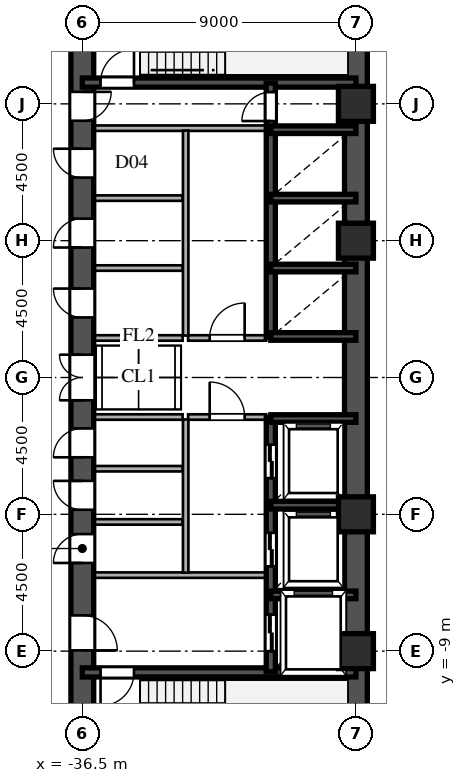
"""IFC4 building model, lengths in metres.
Left out: names, types, materials, properties, quantities, classifications, styles, units other than length and angle.
Written with IfcOpenShell. Run it as: python <this file> out.ifc"""

import sys

from ifc_helpers import new_model, si_unit, direction, frame, frame_2d, origin, origin_2d, place, context, subcontext, project, spatial, rectangle, hollow_rectangle, extrude, source, transform, mapped, element, fill, save


model = new_model("IFC4")
c1 = context("Model", 3, precision=1e-05, world=origin(), true_north=direction((0.0, 1.0)))
c2 = subcontext(c1, "Body", "Model", "MODEL_VIEW")
j1 = project(units=[si_unit("LENGTHUNIT", "METRE"), si_unit("PLANEANGLEUNIT", "RADIAN")], contexts=[c1])
p1 = place(None, origin())
s1 = spatial("IfcSite", under=j1, at=p1, CompositionType="ELEMENT")
p2 = place(p1, origin())
s2 = spatial("IfcBuilding", under=s1, at=p2, CompositionType="ELEMENT")
p3 = place(p2, frame((0.0, 0.0, 33.3)))
s3 = spatial("IfcBuildingStorey", under=s2, at=p3, CompositionType="ELEMENT", Elevation=33.3)
m1 = source(origin(), c2, "Body", "SweptSolid", [
    extrude(hollow_rectangle(XDim=1.15, YDim=1.15, WallThickness=0.048, at=origin_2d()), origin(), (0.0, 0.0, 1.0), 3.6),
])
for number, where, z_axis, x_axis in (
    (1, (-27.5, -9.0, 0.0), (0.0, 0.0, 1.0), (1.0, 0.0, 0.0)),
    (2, (-27.5, -4.5, 0.0), (0.0, 0.0, 1.0), (1.0, 0.0, 0.0)),
    (3, (-27.5, 4.5, 0.0), (0.0, 0.0, 1.0), (1.0, 0.0, 0.0)),
    (4, (-27.5, 9.0, 0.0), (0.0, 0.0, 1.0), (1.0, 0.0, 0.0)),
):
    element("IfcColumn", number, at=place(p3, frame(where, z_axis=z_axis, x_axis=x_axis)), inside=s3, PredefinedType="COLUMN", context=c2, shape_type="MappedRepresentation", body=[
        mapped(m1, transform((0.0, 0.0, 0.0), scale=1.0)),
    ])
for number, where, z_axis, x_axis in (
    (5, (-27.5, -13.5, 0.0), (0.0, 0.0, 1.0), (0.0, 1.0, 0.0)),
    (6, (-27.5, 1.3, 0.0), (0.0, 0.0, 1.0), (0.0, 1.0, 0.0)),
):
    element("IfcWall", number, at=place(p3, frame(where, z_axis=z_axis, x_axis=x_axis)), inside=s3, PredefinedType="SHEAR", context=c2, shape_type="SweptSolid", body=[
        extrude(rectangle(XDim=12.2, YDim=0.75, at=frame_2d((6.1, 0.0))), origin(), (0.0, 0.0, 1.0), 3.38),
    ])
p4 = place(p3, frame((-27.5, -1.3, 0.0), z_axis=(0.0, 0.0, 1.0), x_axis=(0.0, 1.0, 0.0)))
e7 = element("IfcWall", 7, at=p4, inside=s3, PredefinedType="SHEAR", context=c2, shape_type="SweptSolid", body=[
    extrude(rectangle(XDim=2.6, YDim=0.75, at=frame_2d((1.3, 0.0))), origin(), (0.0, 0.0, 1.0), 3.38),
])
p5 = place(p3, frame((-36.5, -13.65, 0.0), z_axis=(0.0, 0.0, 1.0), x_axis=(0.0, 1.0, 0.0)))
e8 = element("IfcWall", 8, at=p5, inside=s3, PredefinedType="SHEAR", context=c2, shape_type="SweptSolid", body=[
    extrude(rectangle(XDim=7.15, YDim=0.75, at=frame_2d((3.575, 0.0))), origin(), (0.0, 0.0, 1.0), 3.38),
])
p6 = place(p5, frame((4.675, 0.0, 0.0)))
e9 = element("IfcOpeningElement", 9, at=p6, cuts=e8, PredefinedType="OPENING", context=c2, shape_type="SweptSolid", body=[
    extrude(rectangle(XDim=1.15, YDim=2.2, at=frame_2d((0.575, 1.1))), frame((0.0, 0.385, 0.0), z_axis=(0.0, -1.0, 0.0), x_axis=(1.0, 0.0, 0.0)), (0.0, 0.0, 1.0), 0.77),
])
p7 = place(p3, frame((-36.5, -1.3, 0.0), z_axis=(0.0, 0.0, 1.0), x_axis=(0.0, 1.0, 0.0)))
e10 = element("IfcWall", 10, at=p7, inside=s3, PredefinedType="SHEAR", context=c2, shape_type="SweptSolid", body=[
    extrude(rectangle(XDim=2.6, YDim=0.75, at=frame_2d((1.3, 0.0))), origin(), (0.0, 0.0, 1.0), 3.38),
])
p8 = place(p7, frame((0.55, 0.0, 0.0)))
e11 = element("IfcOpeningElement", 11, at=p8, cuts=e10, PredefinedType="OPENING", context=c2, shape_type="SweptSolid", body=[
    extrude(rectangle(XDim=1.5, YDim=2.3, at=frame_2d((0.75, 1.15))), frame((0.0, 0.385, 0.0), z_axis=(0.0, -1.0, 0.0), x_axis=(1.0, 0.0, 0.0)), (0.0, 0.0, 1.0), 0.77),
])
p9 = place(p3, frame((-36.5, 8.2, 0.0), z_axis=(0.0, 0.0, 1.0), x_axis=(0.0, 1.0, 0.0)))
e12 = element("IfcWall", 12, at=p9, inside=s3, PredefinedType="SHEAR", context=c2, shape_type="SweptSolid", body=[
    extrude(rectangle(XDim=5.45, YDim=0.75, at=frame_2d((2.725, 0.0))), origin(), (0.0, 0.0, 1.0), 3.38),
])
p10 = place(p9, frame((0.245, 0.0, 0.0)))
e13 = element("IfcOpeningElement", 13, at=p10, cuts=e12, PredefinedType="OPENING", context=c2, shape_type="SweptSolid", body=[
    extrude(rectangle(XDim=0.95, YDim=2.15, at=frame_2d((0.475, 1.075))), frame((0.0, 0.385, 0.0), z_axis=(0.0, -1.0, 0.0), x_axis=(1.0, 0.0, 0.0)), (0.0, 0.0, 1.0), 0.77),
])
p11 = place(p3, frame((-36.5, -6.5, 0.0), z_axis=(0.0, 0.0, 1.0), x_axis=(0.0, 1.0, 0.0)))
e14 = element("IfcWall", 14, at=p11, inside=s3, PredefinedType="SHEAR", context=c2, shape_type="SweptSolid", body=[
    extrude(rectangle(XDim=1.75, YDim=0.75, at=frame_2d((0.875, 0.0))), origin(), (0.0, 0.0, 1.0), 3.38),
])
p12 = place(p11, frame((0.4, 0.0, 0.0)))
e15 = element("IfcOpeningElement", 15, at=p12, cuts=e14, PredefinedType="OPENING", context=c2, shape_type="SweptSolid", body=[
    extrude(rectangle(XDim=0.95, YDim=2.15, at=frame_2d((0.475, 1.075))), frame((0.0, 0.385, 0.0), z_axis=(0.0, -1.0, 0.0), x_axis=(1.0, 0.0, 0.0)), (0.0, 0.0, 1.0), 0.77),
])
p13 = place(p3, frame((-36.5, -4.75, 0.0), z_axis=(0.0, 0.0, 1.0), x_axis=(0.0, 1.0, 0.0)))
e16 = element("IfcWall", 16, at=p13, inside=s3, PredefinedType="SHEAR", context=c2, shape_type="SweptSolid", body=[
    extrude(rectangle(XDim=1.75, YDim=0.75, at=frame_2d((0.875, 0.0))), origin(), (0.0, 0.0, 1.0), 3.38),
])
p14 = place(p13, frame((0.4, 0.0, 0.0)))
e17 = element("IfcOpeningElement", 17, at=p14, cuts=e16, PredefinedType="OPENING", context=c2, shape_type="SweptSolid", body=[
    extrude(rectangle(XDim=0.95, YDim=2.15, at=frame_2d((0.475, 1.075))), frame((0.0, 0.385, 0.0), z_axis=(0.0, -1.0, 0.0), x_axis=(1.0, 0.0, 0.0)), (0.0, 0.0, 1.0), 0.77),
])
p15 = place(p3, frame((-36.5, -3.0, 0.0), z_axis=(0.0, 0.0, 1.0), x_axis=(0.0, 1.0, 0.0)))
e18 = element("IfcWall", 18, at=p15, inside=s3, PredefinedType="SHEAR", context=c2, shape_type="SweptSolid", body=[
    extrude(rectangle(XDim=1.7, YDim=0.75, at=frame_2d((0.85, 0.0))), origin(), (0.0, 0.0, 1.0), 3.38),
])
p16 = place(p15, frame((0.375, 0.0, 0.0)))
e19 = element("IfcOpeningElement", 19, at=p16, cuts=e18, PredefinedType="OPENING", context=c2, shape_type="SweptSolid", body=[
    extrude(rectangle(XDim=0.95, YDim=2.15, at=frame_2d((0.475, 1.075))), frame((0.0, 0.385, 0.0), z_axis=(0.0, -1.0, 0.0), x_axis=(1.0, 0.0, 0.0)), (0.0, 0.0, 1.0), 0.77),
])
p17 = place(p3, frame((-36.5, 1.3, 0.0), z_axis=(0.0, 0.0, 1.0), x_axis=(0.0, 1.0, 0.0)))
e20 = element("IfcWall", 20, at=p17, inside=s3, PredefinedType="SHEAR", context=c2, shape_type="SweptSolid", body=[
    extrude(rectangle(XDim=2.3, YDim=0.75, at=frame_2d((1.15, 0.0))), origin(), (0.0, 0.0, 1.0), 3.38),
])
p18 = place(p17, frame((0.675, 0.0, 0.0)))
e21 = element("IfcOpeningElement", 21, at=p18, cuts=e20, PredefinedType="OPENING", context=c2, shape_type="SweptSolid", body=[
    extrude(rectangle(XDim=0.95, YDim=2.15, at=frame_2d((0.475, 1.075))), frame((0.0, 0.385, 0.0), z_axis=(0.0, -1.0, 0.0), x_axis=(1.0, 0.0, 0.0)), (0.0, 0.0, 1.0), 0.77),
])
p19 = place(p3, frame((-36.5, 3.6, 0.0), z_axis=(0.0, 0.0, 1.0), x_axis=(0.0, 1.0, 0.0)))
e22 = element("IfcWall", 22, at=p19, inside=s3, PredefinedType="SHEAR", context=c2, shape_type="SweptSolid", body=[
    extrude(rectangle(XDim=2.3, YDim=0.75, at=frame_2d((1.15, 0.0))), origin(), (0.0, 0.0, 1.0), 3.38),
])
p20 = place(p19, frame((0.675, 0.0, 0.0)))
e23 = element("IfcOpeningElement", 23, at=p20, cuts=e22, PredefinedType="OPENING", context=c2, shape_type="SweptSolid", body=[
    extrude(rectangle(XDim=0.95, YDim=2.15, at=frame_2d((0.475, 1.075))), frame((0.0, 0.385, 0.0), z_axis=(0.0, -1.0, 0.0), x_axis=(1.0, 0.0, 0.0)), (0.0, 0.0, 1.0), 0.77),
])
p21 = place(p3, frame((-36.5, 5.9, 0.0), z_axis=(0.0, 0.0, 1.0), x_axis=(0.0, 1.0, 0.0)))
e24 = element("IfcWall", 24, at=p21, inside=s3, PredefinedType="SHEAR", context=c2, shape_type="SweptSolid", body=[
    extrude(rectangle(XDim=2.3, YDim=0.75, at=frame_2d((1.15, 0.0))), origin(), (0.0, 0.0, 1.0), 3.38),
])
p22 = place(p21, frame((0.675, 0.0, 0.0)))
e25 = element("IfcOpeningElement", 25, at=p22, cuts=e24, PredefinedType="OPENING", context=c2, shape_type="SweptSolid", body=[
    extrude(rectangle(XDim=0.95, YDim=2.15, at=frame_2d((0.475, 1.075))), frame((0.0, 0.385, 0.0), z_axis=(0.0, -1.0, 0.0), x_axis=(1.0, 0.0, 0.0)), (0.0, 0.0, 1.0), 0.77),
])
p23 = place(p3, frame((-36.5, -9.7, 0.0), z_axis=(0.0, 0.0, 1.0), x_axis=(1.0, 0.0, 0.0)))
e26 = element("IfcWall", 26, at=p23, inside=s3, PredefinedType="SHEAR", context=c2, shape_type="SweptSolid", body=[
    extrude(rectangle(XDim=9.0, YDim=0.3, at=frame_2d((4.5, 0.0))), origin(), (0.0, 0.0, 1.0), 3.38),
])
p24 = place(p23, frame((0.6, 0.0, 0.0)))
e27 = element("IfcOpeningElement", 27, at=p24, cuts=e26, PredefinedType="OPENING", context=c2, shape_type="SweptSolid", body=[
    extrude(rectangle(XDim=1.1, YDim=2.2, at=frame_2d((0.55, 1.1))), frame((0.0, 0.16, 0.0), z_axis=(0.0, -1.0, 0.0), x_axis=(1.0, 0.0, 0.0)), (0.0, 0.0, 1.0), 0.32),
])
p25 = place(p3, frame((-36.5, 9.7, 0.0), z_axis=(0.0, 0.0, 1.0), x_axis=(1.0, 0.0, 0.0)))
e28 = element("IfcWall", 28, at=p25, inside=s3, PredefinedType="SHEAR", context=c2, shape_type="SweptSolid", body=[
    extrude(rectangle(XDim=9.0, YDim=0.3, at=frame_2d((4.5, 0.0))), origin(), (0.0, 0.0, 1.0), 3.38),
])
p26 = place(p25, frame((0.6, 0.0, 0.0)))
e29 = element("IfcOpeningElement", 29, at=p26, cuts=e28, PredefinedType="OPENING", context=c2, shape_type="SweptSolid", body=[
    extrude(rectangle(XDim=1.1, YDim=2.2, at=frame_2d((0.55, 1.1))), frame((0.0, 0.16, 0.0), z_axis=(0.0, -1.0, 0.0), x_axis=(1.0, 0.0, 0.0)), (0.0, 0.0, 1.0), 0.32),
])
for number, where, z_axis, x_axis in (
    (30, (-30.3, -7.15, 0.0), (0.0, 0.0, 1.0), (1.0, 0.0, 0.0)),
    (31, (-30.3, -4.2, 0.0), (0.0, 0.0, 1.0), (1.0, 0.0, 0.0)),
    (32, (-30.3, -1.35, 0.0), (0.0, 0.0, 1.0), (1.0, 0.0, 0.0)),
    (33, (-30.3, 1.35, 0.0), (0.0, 0.0, 1.0), (1.0, 0.0, 0.0)),
    (34, (-30.3, 3.6, 0.0), (0.0, 0.0, 1.0), (1.0, 0.0, 0.0)),
    (35, (-30.3, 5.9, 0.0), (0.0, 0.0, 1.0), (1.0, 0.0, 0.0)),
    (36, (-30.3, 8.15, 0.0), (0.0, 0.0, 1.0), (1.0, 0.0, 0.0)),
):
    element("IfcWall", number, at=place(p3, frame(where, z_axis=z_axis, x_axis=x_axis)), inside=s3, PredefinedType="SHEAR", context=c2, shape_type="SweptSolid", body=[
        extrude(rectangle(XDim=2.8, YDim=0.25, at=frame_2d((1.4, 0.0))), origin(), (0.0, 0.0, 1.0), 3.38),
    ])
p27 = place(p3, frame((-30.3, -9.68, 0.0), z_axis=(0.0, 0.0, 1.0), x_axis=(0.0, 1.0, 0.0)))
e37 = element("IfcWall", 37, at=p27, inside=s3, PredefinedType="SHEAR", context=c2, shape_type="SweptSolid", body=[
    extrude(rectangle(XDim=2.56, YDim=0.3, at=frame_2d((1.28, 0.0))), origin(), (0.0, 0.0, 1.0), 3.38),
])
p28 = place(p27, frame((0.68, 0.0, 0.0)))
e38 = element("IfcOpeningElement", 38, at=p28, cuts=e37, PredefinedType="OPENING", context=c2, shape_type="SweptSolid", body=[
    extrude(rectangle(XDim=1.2, YDim=2.25, at=frame_2d((0.6, 1.125))), frame((0.0, 0.16, 0.0), z_axis=(0.0, -1.0, 0.0), x_axis=(1.0, 0.0, 0.0)), (0.0, 0.0, 1.0), 0.32),
])
p29 = place(p3, frame((-30.3, -7.12, 0.0), z_axis=(0.0, 0.0, 1.0), x_axis=(0.0, 1.0, 0.0)))
e39 = element("IfcWall", 39, at=p29, inside=s3, PredefinedType="SHEAR", context=c2, shape_type="SweptSolid", body=[
    extrude(rectangle(XDim=2.92, YDim=0.3, at=frame_2d((1.46, 0.0))), origin(), (0.0, 0.0, 1.0), 3.38),
])
p30 = place(p29, frame((0.91, 0.0, 0.0)))
e40 = element("IfcOpeningElement", 40, at=p30, cuts=e39, PredefinedType="OPENING", context=c2, shape_type="SweptSolid", body=[
    extrude(rectangle(XDim=1.1, YDim=2.2, at=frame_2d((0.55, 1.1))), frame((0.0, 0.16, 0.0), z_axis=(0.0, -1.0, 0.0), x_axis=(1.0, 0.0, 0.0)), (0.0, 0.0, 1.0), 0.32),
])
p31 = place(p3, frame((-30.3, -4.2, 0.0), z_axis=(0.0, 0.0, 1.0), x_axis=(0.0, 1.0, 0.0)))
e41 = element("IfcWall", 41, at=p31, inside=s3, PredefinedType="SHEAR", context=c2, shape_type="SweptSolid", body=[
    extrude(rectangle(XDim=2.88, YDim=0.3, at=frame_2d((1.44, 0.0))), origin(), (0.0, 0.0, 1.0), 3.38),
])
p32 = place(p31, frame((0.89, 0.0, 0.0)))
e42 = element("IfcOpeningElement", 42, at=p32, cuts=e41, PredefinedType="OPENING", context=c2, shape_type="SweptSolid", body=[
    extrude(rectangle(XDim=1.1, YDim=2.2, at=frame_2d((0.55, 1.1))), frame((0.0, 0.16, 0.0), z_axis=(0.0, -1.0, 0.0), x_axis=(1.0, 0.0, 0.0)), (0.0, 0.0, 1.0), 0.32),
])
p33 = place(p3, frame((-30.3, 1.32, 0.0), z_axis=(0.0, 0.0, 1.0), x_axis=(0.0, 1.0, 0.0)))
e43 = element("IfcWall", 43, at=p33, inside=s3, PredefinedType="SHEAR", context=c2, shape_type="SweptSolid", body=[
    extrude(rectangle(XDim=2.28, YDim=0.3, at=frame_2d((1.14, 0.0))), origin(), (0.0, 0.0, 1.0), 3.38),
])
p34 = place(p3, frame((-30.3, 3.6, 0.0), z_axis=(0.0, 0.0, 1.0), x_axis=(0.0, 1.0, 0.0)))
e44 = element("IfcWall", 44, at=p34, inside=s3, PredefinedType="SHEAR", context=c2, shape_type="SweptSolid", body=[
    extrude(rectangle(XDim=2.3, YDim=0.3, at=frame_2d((1.15, 0.0))), origin(), (0.0, 0.0, 1.0), 3.38),
])
p35 = place(p3, frame((-30.3, 5.9, 0.0), z_axis=(0.0, 0.0, 1.0), x_axis=(0.0, 1.0, 0.0)))
e45 = element("IfcWall", 45, at=p35, inside=s3, PredefinedType="SHEAR", context=c2, shape_type="SweptSolid", body=[
    extrude(rectangle(XDim=2.25, YDim=0.3, at=frame_2d((1.125, 0.0))), origin(), (0.0, 0.0, 1.0), 3.38),
])
p36 = place(p3, frame((-30.3, 8.15, 0.0), z_axis=(0.0, 0.0, 1.0), x_axis=(0.0, 1.0, 0.0)))
e46 = element("IfcWall", 46, at=p36, inside=s3, PredefinedType="SHEAR", context=c2, shape_type="SweptSolid", body=[
    extrude(rectangle(XDim=1.53, YDim=0.3, at=frame_2d((0.765, 0.0))), origin(), (0.0, 0.0, 1.0), 3.38),
])
p37 = place(p36, frame((0.285, 0.0, 0.0)))
e47 = element("IfcOpeningElement", 47, at=p37, cuts=e46, PredefinedType="OPENING", context=c2, shape_type="SweptSolid", body=[
    extrude(rectangle(XDim=0.95, YDim=2.15, at=frame_2d((0.475, 1.075))), frame((0.0, 0.16, 0.0), z_axis=(0.0, -1.0, 0.0), x_axis=(1.0, 0.0, 0.0)), (0.0, 0.0, 1.0), 0.32),
])
for number, where, z_axis, x_axis in (
    (48, (-36.15, -6.5, 0.0), (0.0, 0.0, 1.0), (1.0, 0.0, 0.0)),
    (49, (-36.15, 8.2, 0.0), (0.0, 0.0, 1.0), (1.0, 0.0, 0.0)),
):
    element("IfcWall", number, at=place(p3, frame(where, z_axis=z_axis, x_axis=x_axis)), inside=s3, PredefinedType="PARTITIONING", context=c2, shape_type="SweptSolid", body=[
        extrude(rectangle(XDim=5.7, YDim=0.18, at=frame_2d((2.85, 0.0))), origin(), (0.0, 0.0, 1.0), 3.38),
    ])
p38 = place(p3, frame((-33.1, -6.42, 0.0), z_axis=(0.0, 0.0, 1.0), x_axis=(0.0, 1.0, 0.0)))
e50 = element("IfcWall", 50, at=p38, inside=s3, PredefinedType="PARTITIONING", context=c2, shape_type="SweptSolid", body=[
    extrude(rectangle(XDim=5.04, YDim=0.18, at=frame_2d((2.52, 0.0))), origin(), (0.0, 0.0, 1.0), 3.38),
])
p39 = place(p3, frame((-33.1, 1.38, 0.0), z_axis=(0.0, 0.0, 1.0), x_axis=(0.0, 1.0, 0.0)))
e51 = element("IfcWall", 51, at=p39, inside=s3, PredefinedType="PARTITIONING", context=c2, shape_type="SweptSolid", body=[
    extrude(rectangle(XDim=6.74, YDim=0.18, at=frame_2d((3.37, 0.0))), origin(), (0.0, 0.0, 1.0), 3.38),
])
p40 = place(p3, frame((-33.02, -1.3, 0.0), z_axis=(0.0, 0.0, 1.0), x_axis=(1.0, 0.0, 0.0)))
e52 = element("IfcWall", 52, at=p40, inside=s3, PredefinedType="PARTITIONING", context=c2, shape_type="SweptSolid", body=[
    extrude(rectangle(XDim=2.57, YDim=0.18, at=frame_2d((1.285, 0.0))), origin(), (0.0, 0.0, 1.0), 3.38),
])
p41 = place(p40, frame((0.71, 0.0, 0.0)))
e53 = element("IfcOpeningElement", 53, at=p41, cuts=e52, PredefinedType="OPENING", context=c2, shape_type="SweptSolid", body=[
    extrude(rectangle(XDim=1.15, YDim=2.2, at=frame_2d((0.575, 1.1))), frame((0.0, 0.1, 0.0), z_axis=(0.0, -1.0, 0.0), x_axis=(1.0, 0.0, 0.0)), (0.0, 0.0, 1.0), 0.2),
])
p42 = place(p3, frame((-33.02, 1.3, 0.0), z_axis=(0.0, 0.0, 1.0), x_axis=(1.0, 0.0, 0.0)))
e54 = element("IfcWall", 54, at=p42, inside=s3, PredefinedType="PARTITIONING", context=c2, shape_type="SweptSolid", body=[
    extrude(rectangle(XDim=2.57, YDim=0.18, at=frame_2d((1.285, 0.0))), origin(), (0.0, 0.0, 1.0), 3.38),
])
p43 = place(p42, frame((0.71, 0.0, 0.0)))
e55 = element("IfcOpeningElement", 55, at=p43, cuts=e54, PredefinedType="OPENING", context=c2, shape_type="SweptSolid", body=[
    extrude(rectangle(XDim=1.15, YDim=2.2, at=frame_2d((0.575, 1.1))), frame((0.0, 0.1, 0.0), z_axis=(0.0, -1.0, 0.0), x_axis=(1.0, 0.0, 0.0)), (0.0, 0.0, 1.0), 0.2),
])
for number, where, z_axis, x_axis in (
    (56, (-36.15, -1.3, 0.0), (0.0, 0.0, 1.0), (1.0, 0.0, 0.0)),
    (57, (-36.15, 1.3, 0.0), (0.0, 0.0, 1.0), (1.0, 0.0, 0.0)),
    (58, (-36.15, -4.75, 0.0), (0.0, 0.0, 1.0), (1.0, 0.0, 0.0)),
    (59, (-36.15, -3.0, 0.0), (0.0, 0.0, 1.0), (1.0, 0.0, 0.0)),
    (60, (-36.15, 3.6, 0.0), (0.0, 0.0, 1.0), (1.0, 0.0, 0.0)),
    (61, (-36.15, 5.9, 0.0), (0.0, 0.0, 1.0), (1.0, 0.0, 0.0)),
):
    element("IfcWall", number, at=place(p3, frame(where, z_axis=z_axis, x_axis=x_axis)), inside=s3, PredefinedType="PARTITIONING", context=c2, shape_type="SweptSolid", body=[
        extrude(rectangle(XDim=2.95, YDim=0.18, at=frame_2d((1.475, 0.0))), origin(), (0.0, 0.0, 1.0), 3.38),
    ])
m2 = source(origin(), c2, "Body", "SweptSolid", [
    extrude(rectangle(XDim=1.15, YDim=2.2, at=frame_2d((0.575, 1.1))), frame((0.0, 0.025, 0.0), z_axis=(0.0, -1.0, 0.0), x_axis=(1.0, 0.0, 0.0)), (0.0, 0.0, 1.0), 0.05),
])
p44 = place(p6, frame((1.15, 0.0, 0.0), z_axis=(0.0, 0.0, 1.0), x_axis=(-1.0, 0.0, 0.0)))
e62 = element("IfcDoor", 62, at=p44, inside=s3, OperationType="SINGLE_SWING_LEFT", PredefinedType="DOOR", context=c2, shape_type="MappedRepresentation", body=[
    mapped(m2, transform((0.0, 0.0, 0.0), scale=1.0)),
])
fill(e9, e62)
m3 = source(origin(), c2, "Body", "SweptSolid", [
    extrude(rectangle(XDim=1.5, YDim=2.3, at=frame_2d((0.75, 1.15))), frame((0.0, 0.025, 0.0), z_axis=(0.0, -1.0, 0.0), x_axis=(1.0, 0.0, 0.0)), (0.0, 0.0, 1.0), 0.05),
])
p45 = place(p8, origin())
e63 = element("IfcDoor", 63, at=p45, inside=s3, OperationType="DOUBLE_SWING_LEFT", PredefinedType="DOOR", context=c2, shape_type="MappedRepresentation", body=[
    mapped(m3, transform((0.0, 0.0, 0.0), scale=1.0)),
])
fill(e11, e63)
m4 = source(origin(), c2, "Body", "SweptSolid", [
    extrude(rectangle(XDim=0.95, YDim=2.15, at=frame_2d((0.475, 1.075))), frame((0.0, 0.025, 0.0), z_axis=(0.0, -1.0, 0.0), x_axis=(1.0, 0.0, 0.0)), (0.0, 0.0, 1.0), 0.05),
])
p46 = place(p10, frame((0.95, 0.0, 0.0), z_axis=(0.0, 0.0, 1.0), x_axis=(-1.0, 0.0, 0.0)))
e64 = element("IfcDoor", 64, at=p46, inside=s3, OperationType="SINGLE_SWING_RIGHT", PredefinedType="DOOR", context=c2, shape_type="MappedRepresentation", body=[
    mapped(m4, transform((0.0, 0.0, 0.0), scale=1.0)),
])
fill(e13, e64)
p47 = place(p12, origin())
e65 = element("IfcDoor", 65, at=p47, inside=s3, OperationType="SINGLE_SWING_LEFT", PredefinedType="DOOR", context=c2, shape_type="MappedRepresentation", body=[
    mapped(m4, transform((0.0, 0.0, 0.0), scale=1.0)),
])
fill(e15, e65)
p48 = place(p14, origin())
e66 = element("IfcDoor", 66, at=p48, inside=s3, OperationType="SINGLE_SWING_RIGHT", PredefinedType="DOOR", context=c2, shape_type="MappedRepresentation", body=[
    mapped(m4, transform((0.0, 0.0, 0.0), scale=1.0)),
])
fill(e17, e66)
p49 = place(p16, origin())
e67 = element("IfcDoor", 67, at=p49, inside=s3, OperationType="SINGLE_SWING_LEFT", PredefinedType="DOOR", context=c2, shape_type="MappedRepresentation", body=[
    mapped(m4, transform((0.0, 0.0, 0.0), scale=1.0)),
])
fill(e19, e67)
p50 = place(p18, origin())
e68 = element("IfcDoor", 68, at=p50, inside=s3, OperationType="SINGLE_SWING_RIGHT", PredefinedType="DOOR", context=c2, shape_type="MappedRepresentation", body=[
    mapped(m4, transform((0.0, 0.0, 0.0), scale=1.0)),
])
fill(e21, e68)
p51 = place(p20, origin())
e69 = element("IfcDoor", 69, at=p51, inside=s3, OperationType="SINGLE_SWING_LEFT", PredefinedType="DOOR", context=c2, shape_type="MappedRepresentation", body=[
    mapped(m4, transform((0.0, 0.0, 0.0), scale=1.0)),
])
fill(e23, e69)
p52 = place(p22, origin())
e70 = element("IfcDoor", 70, at=p52, inside=s3, OperationType="SINGLE_SWING_RIGHT", PredefinedType="DOOR", context=c2, shape_type="MappedRepresentation", body=[
    mapped(m4, transform((0.0, 0.0, 0.0), scale=1.0)),
])
fill(e25, e70)
m5 = source(origin(), c2, "Body", "SweptSolid", [
    extrude(rectangle(XDim=1.1, YDim=2.2, at=frame_2d((0.55, 1.1))), frame((0.0, 0.025, 0.0), z_axis=(0.0, -1.0, 0.0), x_axis=(1.0, 0.0, 0.0)), (0.0, 0.0, 1.0), 0.05),
])
p53 = place(p24, frame((1.1, 0.0, 0.0), z_axis=(0.0, 0.0, 1.0), x_axis=(-1.0, 0.0, 0.0)))
e71 = element("IfcDoor", 71, at=p53, inside=s3, OperationType="SINGLE_SWING_LEFT", PredefinedType="DOOR", context=c2, shape_type="MappedRepresentation", body=[
    mapped(m5, transform((0.0, 0.0, 0.0), scale=1.0)),
])
fill(e27, e71)
p54 = place(p26, origin())
e72 = element("IfcDoor", 72, at=p54, inside=s3, OperationType="SINGLE_SWING_RIGHT", PredefinedType="DOOR", context=c2, shape_type="MappedRepresentation", body=[
    mapped(m5, transform((0.0, 0.0, 0.0), scale=1.0)),
])
fill(e29, e72)
m6 = source(origin(), c2, "Body", "SweptSolid", [
    extrude(rectangle(XDim=1.2, YDim=2.25, at=frame_2d((0.6, 1.125))), frame((0.0, 0.025, 0.0), z_axis=(0.0, -1.0, 0.0), x_axis=(1.0, 0.0, 0.0)), (0.0, 0.0, 1.0), 0.05),
])
p55 = place(p28, origin())
e73 = element("IfcDoor", 73, at=p55, inside=s3, OperationType="DOUBLE_DOOR_SLIDING", PredefinedType="DOOR", context=c2, shape_type="MappedRepresentation", body=[
    mapped(m6, transform((0.0, 0.0, 0.0), scale=1.0)),
])
fill(e38, e73)
m7 = source(origin(), c2, "Body", "SweptSolid", [
    extrude(rectangle(XDim=1.1, YDim=2.2, at=frame_2d((0.55, 1.1))), frame((0.0, 0.025, 0.0), z_axis=(0.0, -1.0, 0.0), x_axis=(1.0, 0.0, 0.0)), (0.0, 0.0, 1.0), 0.05),
])
p56 = place(p30, origin())
e74 = element("IfcDoor", 74, at=p56, inside=s3, OperationType="DOUBLE_DOOR_SLIDING", PredefinedType="DOOR", context=c2, shape_type="MappedRepresentation", body=[
    mapped(m7, transform((0.0, 0.0, 0.0), scale=1.0)),
])
fill(e40, e74)
p57 = place(p32, origin())
e75 = element("IfcDoor", 75, at=p57, inside=s3, OperationType="DOUBLE_DOOR_SLIDING", PredefinedType="DOOR", context=c2, shape_type="MappedRepresentation", body=[
    mapped(m7, transform((0.0, 0.0, 0.0), scale=1.0)),
])
fill(e42, e75)
p58 = place(p37, origin())
e76 = element("IfcDoor", 76, at=p58, inside=s3, OperationType="SINGLE_SWING_LEFT", PredefinedType="DOOR", context=c2, shape_type="MappedRepresentation", body=[
    mapped(m4, transform((0.0, 0.0, 0.0), scale=1.0)),
])
fill(e47, e76)
p59 = place(p41, origin())
e77 = element("IfcDoor", 77, at=p59, inside=s3, OperationType="SINGLE_SWING_LEFT", PredefinedType="DOOR", context=c2, shape_type="MappedRepresentation", body=[
    mapped(m2, transform((0.0, 0.0, 0.0), scale=1.0)),
])
fill(e53, e77)
p60 = place(p43, origin())
e78 = element("IfcDoor", 78, at=p60, inside=s3, OperationType="SINGLE_SWING_RIGHT", PredefinedType="DOOR", context=c2, shape_type="MappedRepresentation", body=[
    mapped(m2, transform((0.0, 0.0, 0.0), scale=1.0)),
])
fill(e55, e78)
save(model, sys.argv[1])
